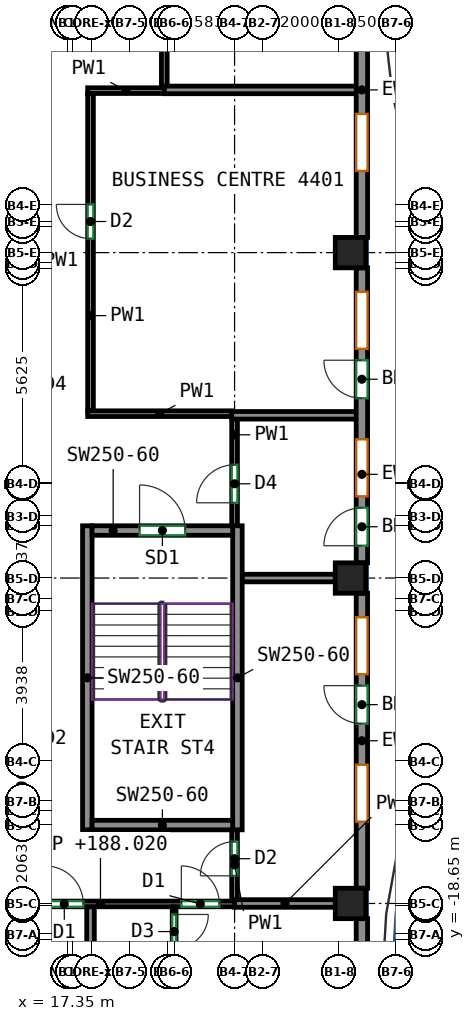
"""IFC4 building model, lengths in metres.
Left out: names, types, materials, properties, quantities, classifications, styles, units other than length and angle.
Written with IfcOpenShell. Run it as: python <this file> out.ifc"""

import sys

from ifc_helpers import new_model, si_unit, direction, frame, frame_2d, origin, origin_2d, place, context, subcontext, project, spatial, rectangle, extrude, source, transform, mapped, element, fill, save


model = new_model("IFC4")
c1 = context("Model", 3, precision=1e-05, world=origin(), true_north=direction((0.0, 1.0)))
c2 = subcontext(c1, "Body", "Model", "MODEL_VIEW")
j1 = project(units=[si_unit("LENGTHUNIT", "METRE"), si_unit("PLANEANGLEUNIT", "RADIAN")], contexts=[c1])
p1 = place(None, origin())
s1 = spatial("IfcSite", under=j1, at=p1, CompositionType="ELEMENT")
p2 = place(p1, origin())
s2 = spatial("IfcBuilding", under=s1, at=p2, CompositionType="ELEMENT")
p3 = place(p2, frame((0.0, 0.0, 185.5)))
s3 = spatial("IfcBuildingStorey", under=s2, at=p3, CompositionType="ELEMENT", Elevation=185.5)
m1 = source(origin(), c2, "Body", "SweptSolid", [
    extrude(rectangle(XDim=0.8, YDim=0.8, at=origin_2d()), origin(), (0.0, 0.0, 1.0), 3.12),
])
for number, where, z_axis, x_axis in (
    (1, (24.8, -17.688, 0.0), (0.0, 0.0, 1.0), (1.0, 0.0, 0.0)),
    (2, (24.8, -9.125, 0.0), (0.0, 0.0, 1.0), (1.0, 0.0, 0.0)),
    (3, (24.8, -0.562, 0.0), (0.0, 0.0, 1.0), (1.0, 0.0, 0.0)),
):
    element("IfcColumn", number, at=place(p3, frame(where, z_axis=z_axis, x_axis=x_axis)), inside=s3, PredefinedType="COLUMN", context=c2, shape_type="MappedRepresentation", body=[
        mapped(m1, transform((0.0, 0.0, 0.0))),
    ])
m2 = source(origin(), c2, "Body", "SweptSolid", [
    extrude(rectangle(XDim=8.0, YDim=0.25, at=frame_2d((4.0, 0.0))), origin(), (0.0, 0.0, 1.0), 3.12),
])
for number, where, z_axis, x_axis in (
    (4, (17.875, -15.75, 0.0), (0.0, 0.0, 1.0), (0.0, 1.0, 0.0)),
    (5, (21.825, -15.75, 0.0), (0.0, 0.0, 1.0), (0.0, 1.0, 0.0)),
):
    element("IfcWall", number, at=place(p3, frame(where, z_axis=z_axis, x_axis=x_axis)), inside=s3, PredefinedType="SHEAR", context=c2, shape_type="MappedRepresentation", body=[
        mapped(m2, transform((0.0, 0.0, 0.0))),
    ])
m3 = source(origin(), c2, "Body", "SweptSolid", [
    extrude(rectangle(XDim=3.7, YDim=0.25, at=frame_2d((1.85, 0.0))), origin(), (0.0, 0.0, 1.0), 3.12),
])
p4 = place(p3, frame((18.0, -15.625, 0.0), z_axis=(0.0, 0.0, 1.0), x_axis=(1.0, 0.0, 0.0)))
e6 = element("IfcWall", 6, at=p4, inside=s3, PredefinedType="SHEAR", context=c2, shape_type="MappedRepresentation", body=[
    mapped(m3, transform((0.0, 0.0, 0.0))),
])
p5 = place(p3, frame((18.0, -7.875, 0.0), z_axis=(0.0, 0.0, 1.0), x_axis=(1.0, 0.0, 0.0)))
e7 = element("IfcWall", 7, at=p5, inside=s3, PredefinedType="SHEAR", context=c2, shape_type="MappedRepresentation", body=[
    mapped(m3, transform((0.0, 0.0, 0.0))),
])
p6 = place(p5, frame((1.25, 0.0, 0.0)))
e8 = element("IfcOpeningElement", 8, at=p6, cuts=e7, PredefinedType="OPENING", context=c2, shape_type="SweptSolid", body=[
    extrude(rectangle(XDim=1.2, YDim=2.1, at=frame_2d((0.6, 1.05))), frame((0.0, 0.135, 0.0), z_axis=(0.0, -1.0, 0.0), x_axis=(1.0, 0.0, 0.0)), (0.0, 0.0, 1.0), 0.27),
])
m4 = source(origin(), c2, "Body", "SweptSolid", [
    extrude(rectangle(XDim=3.944, YDim=0.3, at=frame_2d((1.972, 0.0))), origin(), (0.0, 0.0, 1.0), 3.12),
])
p7 = place(p3, frame((25.1, -22.032, 0.0), z_axis=(0.0, 0.0, 1.0), x_axis=(0.0, 1.0, 0.0)))
e9 = element("IfcWall", 9, at=p7, inside=s3, PredefinedType="SOLIDWALL", context=c2, shape_type="MappedRepresentation", body=[
    mapped(m4, transform((0.0, 0.0, 0.0))),
])
p8 = place(p7, frame((1.75, 0.0, 0.85)))
e10 = element("IfcOpeningElement", 10, at=p8, cuts=e9, PredefinedType="OPENING", context=c2, shape_type="SweptSolid", body=[
    extrude(rectangle(XDim=1.5, YDim=1.95, at=frame_2d((0.75, 0.975))), frame((0.0, 0.16, 0.0), z_axis=(0.0, -1.0, 0.0), x_axis=(1.0, 0.0, 0.0)), (0.0, 0.0, 1.0), 0.32),
])
m5 = source(origin(), c2, "Body", "SweptSolid", [
    extrude(rectangle(XDim=7.763, YDim=0.3, at=frame_2d((3.881, 0.0))), origin(), (0.0, 0.0, 1.0), 3.12),
])
p9 = place(p3, frame((25.1, -17.288, 0.0), z_axis=(0.0, 0.0, 1.0), x_axis=(0.0, 1.0, 0.0)))
e11 = element("IfcWall", 11, at=p9, inside=s3, PredefinedType="SOLIDWALL", context=c2, shape_type="MappedRepresentation", body=[
    mapped(m5, transform((0.0, 0.0, 0.0))),
])
p10 = place(p9, frame((1.75, 0.0, 0.85)))
e12 = element("IfcOpeningElement", 12, at=p10, cuts=e11, PredefinedType="OPENING", context=c2, shape_type="SweptSolid", body=[
    extrude(rectangle(XDim=1.5, YDim=1.95, at=frame_2d((0.75, 0.975))), frame((0.0, 0.16, 0.0), z_axis=(0.0, -1.0, 0.0), x_axis=(1.0, 0.0, 0.0)), (0.0, 0.0, 1.0), 0.32),
])
p11 = place(p9, frame((5.631, 0.0, 0.85)))
e13 = element("IfcOpeningElement", 13, at=p11, cuts=e11, PredefinedType="OPENING", context=c2, shape_type="SweptSolid", body=[
    extrude(rectangle(XDim=1.5, YDim=1.95, at=frame_2d((0.75, 0.975))), frame((0.0, 0.16, 0.0), z_axis=(0.0, -1.0, 0.0), x_axis=(1.0, 0.0, 0.0)), (0.0, 0.0, 1.0), 0.32),
])
p12 = place(p9, frame((4.331, 0.0, 0.0)))
e14 = element("IfcOpeningElement", 14, at=p12, cuts=e11, PredefinedType="OPENING", context=c2, shape_type="SweptSolid", body=[
    extrude(rectangle(XDim=1.0, YDim=2.1, at=frame_2d((0.5, 1.05))), frame((0.0, 0.16, 0.0), z_axis=(0.0, -1.0, 0.0), x_axis=(1.0, 0.0, 0.0)), (0.0, 0.0, 1.0), 0.32),
])
p13 = place(p3, frame((25.1, -8.725, 0.0), z_axis=(0.0, 0.0, 1.0), x_axis=(0.0, 1.0, 0.0)))
e15 = element("IfcWall", 15, at=p13, inside=s3, PredefinedType="SOLIDWALL", context=c2, shape_type="MappedRepresentation", body=[
    mapped(m5, transform((0.0, 0.0, 0.0))),
])
p14 = place(p13, frame((1.75, 0.0, 0.85)))
e16 = element("IfcOpeningElement", 16, at=p14, cuts=e15, PredefinedType="OPENING", context=c2, shape_type="SweptSolid", body=[
    extrude(rectangle(XDim=1.5, YDim=1.95, at=frame_2d((0.75, 0.975))), frame((0.0, 0.16, 0.0), z_axis=(0.0, -1.0, 0.0), x_axis=(1.0, 0.0, 0.0)), (0.0, 0.0, 1.0), 0.32),
])
p15 = place(p13, frame((0.45, 0.0, 0.0)))
e17 = element("IfcOpeningElement", 17, at=p15, cuts=e15, PredefinedType="OPENING", context=c2, shape_type="SweptSolid", body=[
    extrude(rectangle(XDim=1.0, YDim=2.1, at=frame_2d((0.5, 1.05))), frame((0.0, 0.16, 0.0), z_axis=(0.0, -1.0, 0.0), x_axis=(1.0, 0.0, 0.0)), (0.0, 0.0, 1.0), 0.32),
])
p16 = place(p13, frame((5.631, 0.0, 0.85)))
e18 = element("IfcOpeningElement", 18, at=p16, cuts=e15, PredefinedType="OPENING", context=c2, shape_type="SweptSolid", body=[
    extrude(rectangle(XDim=1.5, YDim=1.95, at=frame_2d((0.75, 0.975))), frame((0.0, 0.16, 0.0), z_axis=(0.0, -1.0, 0.0), x_axis=(1.0, 0.0, 0.0)), (0.0, 0.0, 1.0), 0.32),
])
p17 = place(p13, frame((4.331, 0.0, 0.0)))
e19 = element("IfcOpeningElement", 19, at=p17, cuts=e15, PredefinedType="OPENING", context=c2, shape_type="SweptSolid", body=[
    extrude(rectangle(XDim=1.0, YDim=2.1, at=frame_2d((0.5, 1.05))), frame((0.0, 0.16, 0.0), z_axis=(0.0, -1.0, 0.0), x_axis=(1.0, 0.0, 0.0)), (0.0, 0.0, 1.0), 0.32),
])
p18 = place(p3, frame((25.1, -0.163, 0.0), z_axis=(0.0, 0.0, 1.0), x_axis=(0.0, 1.0, 0.0)))
e20 = element("IfcWall", 20, at=p18, inside=s3, PredefinedType="SOLIDWALL", context=c2, shape_type="MappedRepresentation", body=[
    mapped(m5, transform((0.0, 0.0, 0.0))),
])
p19 = place(p18, frame((1.75, 0.0, 0.85)))
e21 = element("IfcOpeningElement", 21, at=p19, cuts=e20, PredefinedType="OPENING", context=c2, shape_type="SweptSolid", body=[
    extrude(rectangle(XDim=1.5, YDim=1.95, at=frame_2d((0.75, 0.975))), frame((0.0, 0.16, 0.0), z_axis=(0.0, -1.0, 0.0), x_axis=(1.0, 0.0, 0.0)), (0.0, 0.0, 1.0), 0.32),
])
p20 = place(p18, frame((5.631, 0.0, 0.85)))
e22 = element("IfcOpeningElement", 22, at=p20, cuts=e20, PredefinedType="OPENING", context=c2, shape_type="SweptSolid", body=[
    extrude(rectangle(XDim=1.5, YDim=1.95, at=frame_2d((0.75, 0.975))), frame((0.0, 0.16, 0.0), z_axis=(0.0, -1.0, 0.0), x_axis=(1.0, 0.0, 0.0)), (0.0, 0.0, 1.0), 0.32),
])
p21 = place(p3, frame((14.692, -17.7, 0.0), z_axis=(0.0, 0.0, 1.0), x_axis=(1.0, 0.0, 0.0)))
e23 = element("IfcWall", 23, at=p21, inside=s3, PredefinedType="PARTITIONING", context=c2, shape_type="SweptSolid", body=[
    extrude(rectangle(XDim=7.058, YDim=0.15, at=frame_2d((3.529, 0.0))), origin(), (0.0, 0.0, 1.0), 2.52),
])
p22 = place(p21, frame((2.077, 0.0, 0.0)))
e24 = element("IfcOpeningElement", 24, at=p22, cuts=e23, PredefinedType="OPENING", context=c2, shape_type="SweptSolid", body=[
    extrude(rectangle(XDim=1.0, YDim=2.1, at=frame_2d((0.5, 1.05))), frame((0.0, 0.085, 0.0), z_axis=(0.0, -1.0, 0.0), x_axis=(1.0, 0.0, 0.0)), (0.0, 0.0, 1.0), 0.17),
])
p23 = place(p21, frame((5.657, 0.0, 0.0)))
e25 = element("IfcOpeningElement", 25, at=p23, cuts=e23, PredefinedType="OPENING", context=c2, shape_type="SweptSolid", body=[
    extrude(rectangle(XDim=1.0, YDim=2.1, at=frame_2d((0.5, 1.05))), frame((0.0, 0.085, 0.0), z_axis=(0.0, -1.0, 0.0), x_axis=(1.0, 0.0, 0.0)), (0.0, 0.0, 1.0), 0.17),
])
p24 = place(p3, frame((19.9, 3.809, 0.0), z_axis=(0.0, 0.0, 1.0), x_axis=(0.0, 1.0, 0.0)))
e26 = element("IfcWall", 26, at=p24, inside=s3, PredefinedType="PARTITIONING", context=c2, shape_type="SweptSolid", body=[
    extrude(rectangle(XDim=4.101, YDim=0.15, at=frame_2d((2.05, 0.0))), origin(), (0.0, 0.0, 1.0), 3.12),
])
p25 = place(p24, frame((1.4, 0.0, 0.0)))
e27 = element("IfcOpeningElement", 27, at=p25, cuts=e26, PredefinedType="OPENING", context=c2, shape_type="SweptSolid", body=[
    extrude(rectangle(XDim=0.9, YDim=2.1, at=frame_2d((0.45, 1.05))), frame((0.0, 0.085, 0.0), z_axis=(0.0, -1.0, 0.0), x_axis=(1.0, 0.0, 0.0)), (0.0, 0.0, 1.0), 0.17),
])
p26 = place(p3, frame((17.884, 3.7, 0.0), z_axis=(0.0, 0.0, 1.0), x_axis=(1.0, 0.0, 0.0)))
e28 = element("IfcWall", 28, at=p26, inside=s3, PredefinedType="PARTITIONING", context=c2, shape_type="SweptSolid", body=[
    extrude(rectangle(XDim=2.016, YDim=0.15, at=frame_2d((1.008, 0.0))), origin(), (0.0, 0.0, 1.0), 3.12),
])
p27 = place(p3, frame((17.959, -4.725, 0.0), z_axis=(0.0, 0.0, 1.0), x_axis=(0.0, 1.0, 0.0)))
e29 = element("IfcWall", 29, at=p27, inside=s3, PredefinedType="PARTITIONING", context=c2, shape_type="SweptSolid", body=[
    extrude(rectangle(XDim=8.35, YDim=0.15, at=frame_2d((4.175, 0.0))), origin(), (0.0, 0.0, 1.0), 3.12),
])
p28 = place(p27, frame((4.531, 0.0, 0.0)))
e30 = element("IfcOpeningElement", 30, at=p28, cuts=e29, PredefinedType="OPENING", context=c2, shape_type="SweptSolid", body=[
    extrude(rectangle(XDim=0.9, YDim=2.1, at=frame_2d((0.45, 1.05))), frame((0.0, 0.085, 0.0), z_axis=(0.0, -1.0, 0.0), x_axis=(1.0, 0.0, 0.0)), (0.0, 0.0, 1.0), 0.17),
])
p29 = place(p3, frame((17.884, -4.8, 0.0), z_axis=(0.0, 0.0, 1.0), x_axis=(1.0, 0.0, 0.0)))
e31 = element("IfcWall", 31, at=p29, inside=s3, PredefinedType="PARTITIONING", context=c2, shape_type="SweptSolid", body=[
    extrude(rectangle(XDim=3.793, YDim=0.15, at=frame_2d((1.896, 0.0))), origin(), (0.0, 0.0, 1.0), 3.12),
])
p30 = place(p3, frame((21.75, -7.75, 0.0), z_axis=(0.0, 0.0, 1.0), x_axis=(0.0, 1.0, 0.0)))
e32 = element("IfcWall", 32, at=p30, inside=s3, PredefinedType="PARTITIONING", context=c2, shape_type="SweptSolid", body=[
    extrude(rectangle(XDim=2.817, YDim=0.15, at=frame_2d((1.408, 0.0))), origin(), (0.0, 0.0, 1.0), 3.12),
])
p31 = place(p30, frame((0.605, 0.0, 0.0)))
e33 = element("IfcOpeningElement", 33, at=p31, cuts=e32, PredefinedType="OPENING", context=c2, shape_type="SweptSolid", body=[
    extrude(rectangle(XDim=1.0, YDim=2.1, at=frame_2d((0.5, 1.05))), frame((0.0, 0.085, 0.0), z_axis=(0.0, -1.0, 0.0), x_axis=(1.0, 0.0, 0.0)), (0.0, 0.0, 1.0), 0.17),
])
p32 = place(p3, frame((21.75, -17.598, 0.0), z_axis=(0.0, 0.0, 1.0), x_axis=(0.0, 1.0, 0.0)))
e34 = element("IfcWall", 34, at=p32, inside=s3, PredefinedType="PARTITIONING", context=c2, shape_type="SweptSolid", body=[
    extrude(rectangle(XDim=1.848, YDim=0.15, at=frame_2d((0.924, 0.0))), origin(), (0.0, 0.0, 1.0), 3.12),
])
p33 = place(p32, frame((0.638, 0.0, 0.0)))
e35 = element("IfcOpeningElement", 35, at=p33, cuts=e34, PredefinedType="OPENING", context=c2, shape_type="SweptSolid", body=[
    extrude(rectangle(XDim=0.9, YDim=2.1, at=frame_2d((0.45, 1.05))), frame((0.0, 0.085, 0.0), z_axis=(0.0, -1.0, 0.0), x_axis=(1.0, 0.0, 0.0)), (0.0, 0.0, 1.0), 0.17),
])
p34 = place(p3, frame((17.959, -20.648, 0.0), z_axis=(0.0, 0.0, 1.0), x_axis=(0.0, 1.0, 0.0)))
e36 = element("IfcWall", 36, at=p34, inside=s3, PredefinedType="PARTITIONING", context=c2, shape_type="SweptSolid", body=[
    extrude(rectangle(XDim=2.871, YDim=0.2, at=frame_2d((1.436, 0.0))), origin(), (0.0, 0.0, 1.0), 3.12),
])
p35 = place(p3, frame((20.159, -17.777, 0.0), z_axis=(0.0, 0.0, 1.0), x_axis=(0.0, -1.0, 0.0)))
e37 = element("IfcWall", 37, at=p35, inside=s3, PredefinedType="PARTITIONING", context=c2, shape_type="SweptSolid", body=[
    extrude(rectangle(XDim=2.861, YDim=0.1, at=frame_2d((1.43, 0.0))), origin(), (0.0, 0.0, 1.0), 3.12),
])
p36 = place(p35, frame((0.2, 0.0, 0.0)))
e38 = element("IfcOpeningElement", 38, at=p36, cuts=e37, PredefinedType="OPENING", context=c2, shape_type="SweptSolid", body=[
    extrude(rectangle(XDim=0.9, YDim=2.1, at=frame_2d((0.45, 1.05))), frame((0.0, 0.06, 0.0), z_axis=(0.0, -1.0, 0.0), x_axis=(1.0, 0.0, 0.0)), (0.0, 0.0, 1.0), 0.12),
])
p37 = place(p3, frame((21.752, -17.688, 0.0), z_axis=(0.0, 0.0, 1.0), x_axis=(1.0, 0.0, 0.0)))
e39 = element("IfcWall", 39, at=p37, inside=s3, PredefinedType="PARTITIONING", context=c2, shape_type="SweptSolid", body=[
    extrude(rectangle(XDim=2.648, YDim=0.2, at=frame_2d((1.324, 0.0))), origin(), (0.0, 0.0, 1.0), 2.52),
])
p38 = place(p3, frame((19.902, 3.719, 0.0), z_axis=(0.0, 0.0, 1.0), x_axis=(1.0, 0.0, 0.0)))
e40 = element("IfcWall", 40, at=p38, inside=s3, PredefinedType="PARTITIONING", context=c2, shape_type="SweptSolid", body=[
    extrude(rectangle(XDim=5.098, YDim=0.2, at=frame_2d((2.549, 0.0))), origin(), (0.0, 0.0, 1.0), 3.12),
])
p39 = place(p3, frame((21.677, -4.843, 0.0), z_axis=(0.0, 0.0, 1.0), x_axis=(1.0, 0.0, 0.0)))
e41 = element("IfcWall", 41, at=p39, inside=s3, PredefinedType="PARTITIONING", context=c2, shape_type="SweptSolid", body=[
    extrude(rectangle(XDim=3.323, YDim=0.2, at=frame_2d((1.662, 0.0))), origin(), (0.0, 0.0, 1.0), 3.12),
])
p40 = place(p3, frame((21.95, -9.125, 0.0), z_axis=(0.0, 0.0, 1.0), x_axis=(1.0, 0.0, 0.0)))
e42 = element("IfcWall", 42, at=p40, inside=s3, PredefinedType="PARTITIONING", context=c2, shape_type="SweptSolid", body=[
    extrude(rectangle(XDim=2.45, YDim=0.2, at=frame_2d((1.225, 0.0))), origin(), (0.0, 0.0, 1.0), 3.12),
])
p41 = place(p10, origin())
e43 = element("IfcWindow", 43, at=p41, inside=s3, PartitioningType="SINGLE_PANEL", PredefinedType="WINDOW", context=c2, shape_type="SweptSolid", body=[
    extrude(rectangle(XDim=1.5, YDim=1.95, at=frame_2d((0.75, 0.975))), frame((0.0, 0.03, 0.0), z_axis=(0.0, -1.0, 0.0), x_axis=(1.0, 0.0, 0.0)), (0.0, 0.0, 1.0), 0.06),
])
fill(e12, e43)
p42 = place(p11, origin())
e44 = element("IfcWindow", 44, at=p42, inside=s3, PartitioningType="SINGLE_PANEL", PredefinedType="WINDOW", context=c2, shape_type="SweptSolid", body=[
    extrude(rectangle(XDim=1.5, YDim=1.95, at=frame_2d((0.75, 0.975))), frame((0.0, 0.03, 0.0), z_axis=(0.0, -1.0, 0.0), x_axis=(1.0, 0.0, 0.0)), (0.0, 0.0, 1.0), 0.06),
])
fill(e13, e44)
p43 = place(p12, origin())
e45 = element("IfcDoor", 45, at=p43, inside=s3, OperationType="SINGLE_SWING_RIGHT", PredefinedType="DOOR", context=c2, shape_type="SweptSolid", body=[
    extrude(rectangle(XDim=1.0, YDim=2.1, at=frame_2d((0.5, 1.05))), frame((0.0, 0.025, 0.0), z_axis=(0.0, -1.0, 0.0), x_axis=(1.0, 0.0, 0.0)), (0.0, 0.0, 1.0), 0.05),
])
fill(e14, e45)
p44 = place(p14, origin())
e46 = element("IfcWindow", 46, at=p44, inside=s3, PartitioningType="SINGLE_PANEL", PredefinedType="WINDOW", context=c2, shape_type="SweptSolid", body=[
    extrude(rectangle(XDim=1.5, YDim=1.95, at=frame_2d((0.75, 0.975))), frame((0.0, 0.03, 0.0), z_axis=(0.0, -1.0, 0.0), x_axis=(1.0, 0.0, 0.0)), (0.0, 0.0, 1.0), 0.06),
])
fill(e16, e46)
p45 = place(p15, origin())
e47 = element("IfcDoor", 47, at=p45, inside=s3, OperationType="SINGLE_SWING_LEFT", PredefinedType="DOOR", context=c2, shape_type="SweptSolid", body=[
    extrude(rectangle(XDim=1.0, YDim=2.1, at=frame_2d((0.5, 1.05))), frame((0.0, 0.025, 0.0), z_axis=(0.0, -1.0, 0.0), x_axis=(1.0, 0.0, 0.0)), (0.0, 0.0, 1.0), 0.05),
])
fill(e17, e47)
p46 = place(p16, origin())
e48 = element("IfcWindow", 48, at=p46, inside=s3, PartitioningType="SINGLE_PANEL", PredefinedType="WINDOW", context=c2, shape_type="SweptSolid", body=[
    extrude(rectangle(XDim=1.5, YDim=1.95, at=frame_2d((0.75, 0.975))), frame((0.0, 0.03, 0.0), z_axis=(0.0, -1.0, 0.0), x_axis=(1.0, 0.0, 0.0)), (0.0, 0.0, 1.0), 0.06),
])
fill(e18, e48)
p47 = place(p17, origin())
e49 = element("IfcDoor", 49, at=p47, inside=s3, OperationType="SINGLE_SWING_RIGHT", PredefinedType="DOOR", context=c2, shape_type="SweptSolid", body=[
    extrude(rectangle(XDim=1.0, YDim=2.1, at=frame_2d((0.5, 1.05))), frame((0.0, 0.025, 0.0), z_axis=(0.0, -1.0, 0.0), x_axis=(1.0, 0.0, 0.0)), (0.0, 0.0, 1.0), 0.05),
])
fill(e19, e49)
p48 = place(p19, origin())
e50 = element("IfcWindow", 50, at=p48, inside=s3, PartitioningType="SINGLE_PANEL", PredefinedType="WINDOW", context=c2, shape_type="SweptSolid", body=[
    extrude(rectangle(XDim=1.5, YDim=1.95, at=frame_2d((0.75, 0.975))), frame((0.0, 0.03, 0.0), z_axis=(0.0, -1.0, 0.0), x_axis=(1.0, 0.0, 0.0)), (0.0, 0.0, 1.0), 0.06),
])
fill(e21, e50)
p49 = place(p6, origin())
e51 = element("IfcDoor", 51, at=p49, inside=s3, OperationType="DOUBLE_DOOR_SINGLE_SWING", PredefinedType="DOOR", context=c2, shape_type="SweptSolid", body=[
    extrude(rectangle(XDim=1.2, YDim=2.1, at=frame_2d((0.6, 1.05))), frame((0.0, 0.025, 0.0), z_axis=(0.0, -1.0, 0.0), x_axis=(1.0, 0.0, 0.0)), (0.0, 0.0, 1.0), 0.05),
])
fill(e8, e51)
p50 = place(p36, origin())
e52 = element("IfcDoor", 52, at=p50, inside=s3, OperationType="SINGLE_SWING_LEFT", PredefinedType="DOOR", context=c2, shape_type="SweptSolid", body=[
    extrude(rectangle(XDim=0.9, YDim=2.1, at=frame_2d((0.45, 1.05))), frame((0.0, 0.025, 0.0), z_axis=(0.0, -1.0, 0.0), x_axis=(1.0, 0.0, 0.0)), (0.0, 0.0, 1.0), 0.05),
])
fill(e38, e52)
p51 = place(p22, origin())
e53 = element("IfcDoor", 53, at=p51, inside=s3, OperationType="SINGLE_SWING_LEFT", PredefinedType="DOOR", context=c2, shape_type="SweptSolid", body=[
    extrude(rectangle(XDim=1.0, YDim=2.1, at=frame_2d((0.5, 1.05))), frame((0.0, 0.025, 0.0), z_axis=(0.0, -1.0, 0.0), x_axis=(1.0, 0.0, 0.0)), (0.0, 0.0, 1.0), 0.05),
])
fill(e24, e53)
p52 = place(p23, origin())
e54 = element("IfcDoor", 54, at=p52, inside=s3, OperationType="SINGLE_SWING_LEFT", PredefinedType="DOOR", context=c2, shape_type="SweptSolid", body=[
    extrude(rectangle(XDim=1.0, YDim=2.1, at=frame_2d((0.5, 1.05))), frame((0.0, 0.025, 0.0), z_axis=(0.0, -1.0, 0.0), x_axis=(1.0, 0.0, 0.0)), (0.0, 0.0, 1.0), 0.05),
])
fill(e25, e54)
p53 = place(p33, origin())
e55 = element("IfcDoor", 55, at=p53, inside=s3, OperationType="SINGLE_SWING_LEFT", PredefinedType="DOOR", context=c2, shape_type="SweptSolid", body=[
    extrude(rectangle(XDim=0.9, YDim=2.1, at=frame_2d((0.45, 1.05))), frame((0.0, 0.025, 0.0), z_axis=(0.0, -1.0, 0.0), x_axis=(1.0, 0.0, 0.0)), (0.0, 0.0, 1.0), 0.05),
])
fill(e35, e55)
p54 = place(p31, origin())
e56 = element("IfcDoor", 56, at=p54, inside=s3, OperationType="SINGLE_SWING_LEFT", PredefinedType="DOOR", context=c2, shape_type="SweptSolid", body=[
    extrude(rectangle(XDim=1.0, YDim=2.1, at=frame_2d((0.5, 1.05))), frame((0.0, 0.025, 0.0), z_axis=(0.0, -1.0, 0.0), x_axis=(1.0, 0.0, 0.0)), (0.0, 0.0, 1.0), 0.05),
])
fill(e33, e56)
p55 = place(p28, origin())
e57 = element("IfcDoor", 57, at=p55, inside=s3, OperationType="SINGLE_SWING_RIGHT", PredefinedType="DOOR", context=c2, shape_type="SweptSolid", body=[
    extrude(rectangle(XDim=0.9, YDim=2.1, at=frame_2d((0.45, 1.05))), frame((0.0, 0.025, 0.0), z_axis=(0.0, -1.0, 0.0), x_axis=(1.0, 0.0, 0.0)), (0.0, 0.0, 1.0), 0.05),
])
fill(e30, e57)
save(model, sys.argv[1])
